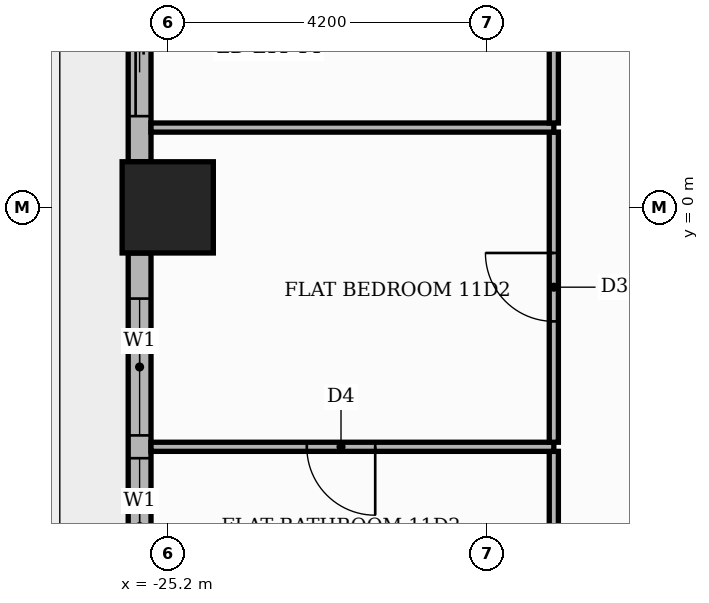
"""IFC4 building model, lengths in metres.
Left out: names, types, materials, properties, quantities, classifications, styles, units other than length and angle.
Written with IfcOpenShell. Run it as: python <this file> out.ifc"""

import sys

from ifc_helpers import new_model, si_unit, direction, frame, frame_2d, origin, origin_2d, place, context, subcontext, project, spatial, rectangle, extrude, element, fill, save


model = new_model("IFC4")
c1 = context("Model", 3, precision=1e-05, world=origin(), true_north=direction((0.0, 1.0)))
c2 = subcontext(c1, "Body", "Model", "MODEL_VIEW")
j1 = project(units=[si_unit("LENGTHUNIT", "METRE"), si_unit("PLANEANGLEUNIT", "RADIAN")], contexts=[c1])
p1 = place(None, origin())
s1 = spatial("IfcSite", under=j1, at=p1, CompositionType="ELEMENT")
p2 = place(p1, origin())
s2 = spatial("IfcBuilding", under=s1, at=p2, CompositionType="ELEMENT")
p3 = place(p2, frame((0.0, 0.0, 50.4)))
s3 = spatial("IfcBuildingStorey", under=s2, at=p3, CompositionType="ELEMENT", Elevation=50.4)
p4 = place(p3, frame((-25.2, 0.0, 0.0), z_axis=(0.0, 0.0, 1.0), x_axis=(1.0, 0.0, 0.0)))
e1 = element("IfcColumn", 1, at=p4, inside=s3, PredefinedType="COLUMN", context=c2, shape_type="SweptSolid", body=[
    extrude(rectangle(XDim=1.2, YDim=1.2, at=origin_2d()), origin(), (0.0, 0.0, 1.0), 3.9),
])
p5 = place(p3, frame((-25.57, 7.8, 0.0), z_axis=(0.0, 0.0, 1.0), x_axis=(0.0, -1.0, 0.0)))
e2 = element("IfcWall", 2, at=p5, inside=s3, PredefinedType="STANDARD", context=c2, shape_type="SweptSolid", body=[
    extrude(rectangle(XDim=7.2, YDim=0.3, at=frame_2d((3.6, 0.0))), origin(), (0.0, 0.0, 1.0), 3.48),
])
p6 = place(p5, frame((0.6, 0.0, 0.9)))
e3 = element("IfcOpeningElement", 3, at=p6, cuts=e2, PredefinedType="OPENING", context=c2, shape_type="SweptSolid", body=[
    extrude(rectangle(XDim=1.8, YDim=2.1, at=frame_2d((0.9, 1.05))), frame((0.0, 0.16, 0.0), z_axis=(0.0, -1.0, 0.0), x_axis=(1.0, 0.0, 0.0)), (0.0, 0.0, 1.0), 0.32),
])
p7 = place(p5, frame((2.7, 0.0, 0.9)))
e4 = element("IfcOpeningElement", 4, at=p7, cuts=e2, PredefinedType="OPENING", context=c2, shape_type="SweptSolid", body=[
    extrude(rectangle(XDim=1.8, YDim=2.1, at=frame_2d((0.9, 1.05))), frame((0.0, 0.16, 0.0), z_axis=(0.0, -1.0, 0.0), x_axis=(1.0, 0.0, 0.0)), (0.0, 0.0, 1.0), 0.32),
])
p8 = place(p5, frame((4.8, 0.0, 0.0)))
e5 = element("IfcOpeningElement", 5, at=p8, cuts=e2, PredefinedType="OPENING", context=c2, shape_type="SweptSolid", body=[
    extrude(rectangle(XDim=1.8, YDim=2.4, at=frame_2d((0.9, 1.2))), frame((0.0, 0.16, 0.0), z_axis=(0.0, -1.0, 0.0), x_axis=(1.0, 0.0, 0.0)), (0.0, 0.0, 1.0), 0.32),
])
p9 = place(p3, frame((-25.57, -0.6, 0.0), z_axis=(0.0, 0.0, 1.0), x_axis=(0.0, -1.0, 0.0)))
e6 = element("IfcWall", 6, at=p9, inside=s3, PredefinedType="STANDARD", context=c2, shape_type="SweptSolid", body=[
    extrude(rectangle(XDim=7.2, YDim=0.3, at=frame_2d((3.6, 0.0))), origin(), (0.0, 0.0, 1.0), 3.48),
])
p10 = place(p9, frame((0.6, 0.0, 0.9)))
e7 = element("IfcOpeningElement", 7, at=p10, cuts=e6, PredefinedType="OPENING", context=c2, shape_type="SweptSolid", body=[
    extrude(rectangle(XDim=1.8, YDim=2.1, at=frame_2d((0.9, 1.05))), frame((0.0, 0.16, 0.0), z_axis=(0.0, -1.0, 0.0), x_axis=(1.0, 0.0, 0.0)), (0.0, 0.0, 1.0), 0.32),
])
p11 = place(p9, frame((2.7, 0.0, 0.9)))
e8 = element("IfcOpeningElement", 8, at=p11, cuts=e6, PredefinedType="OPENING", context=c2, shape_type="SweptSolid", body=[
    extrude(rectangle(XDim=1.8, YDim=2.1, at=frame_2d((0.9, 1.05))), frame((0.0, 0.16, 0.0), z_axis=(0.0, -1.0, 0.0), x_axis=(1.0, 0.0, 0.0)), (0.0, 0.0, 1.0), 0.32),
])
p12 = place(p9, frame((4.8, 0.0, 0.0)))
e9 = element("IfcOpeningElement", 9, at=p12, cuts=e6, PredefinedType="OPENING", context=c2, shape_type="SweptSolid", body=[
    extrude(rectangle(XDim=1.8, YDim=2.4, at=frame_2d((0.9, 1.2))), frame((0.0, 0.16, 0.0), z_axis=(0.0, -1.0, 0.0), x_axis=(1.0, 0.0, 0.0)), (0.0, 0.0, 1.0), 0.32),
])
p13 = place(p3, frame((-20.12, -5.19, 0.0), z_axis=(0.0, 0.0, 1.0), x_axis=(0.0, 1.0, 0.0)))
e10 = element("IfcWall", 10, at=p13, inside=s3, PredefinedType="PARTITIONING", context=c2, shape_type="SweptSolid", body=[
    extrude(rectangle(XDim=1.98, YDim=0.12, at=frame_2d((0.99, 0.0))), origin(), (0.0, 0.0, 1.0), 3.48),
])
p14 = place(p3, frame((-25.42, -3.15, 0.0), z_axis=(0.0, 0.0, 1.0), x_axis=(1.0, 0.0, 0.0)))
e11 = element("IfcWall", 11, at=p14, inside=s3, PredefinedType="PARTITIONING", context=c2, shape_type="SweptSolid", body=[
    extrude(rectangle(XDim=5.3, YDim=0.12, at=frame_2d((2.65, 0.0))), origin(), (0.0, 0.0, 1.0), 3.48),
])
p15 = place(p14, frame((2.05, 0.0, 0.0)))
e12 = element("IfcOpeningElement", 12, at=p15, cuts=e11, PredefinedType="OPENING", context=c2, shape_type="SweptSolid", body=[
    extrude(rectangle(XDim=0.9, YDim=2.1, at=frame_2d((0.45, 1.05))), frame((0.0, 0.07, 0.0), z_axis=(0.0, -1.0, 0.0), x_axis=(1.0, 0.0, 0.0)), (0.0, 0.0, 1.0), 0.14),
])
p16 = place(p3, frame((-20.12, -3.09, 0.0), z_axis=(0.0, 0.0, 1.0), x_axis=(0.0, 1.0, 0.0)))
e13 = element("IfcWall", 13, at=p16, inside=s3, PredefinedType="PARTITIONING", context=c2, shape_type="SweptSolid", body=[
    extrude(rectangle(XDim=4.08, YDim=0.12, at=frame_2d((2.04, 0.0))), origin(), (0.0, 0.0, 1.0), 3.48),
])
p17 = place(p16, frame((1.59, 0.0, 0.0)))
e14 = element("IfcOpeningElement", 14, at=p17, cuts=e13, PredefinedType="OPENING", context=c2, shape_type="SweptSolid", body=[
    extrude(rectangle(XDim=0.9, YDim=2.1, at=frame_2d((0.45, 1.05))), frame((0.0, 0.07, 0.0), z_axis=(0.0, -1.0, 0.0), x_axis=(1.0, 0.0, 0.0)), (0.0, 0.0, 1.0), 0.14),
])
p18 = place(p3, frame((-25.42, 1.05, 0.0), z_axis=(0.0, 0.0, 1.0), x_axis=(1.0, 0.0, 0.0)))
e15 = element("IfcWall", 15, at=p18, inside=s3, PredefinedType="PARTITIONING", context=c2, shape_type="SweptSolid", body=[
    extrude(rectangle(XDim=5.3, YDim=0.12, at=frame_2d((2.65, 0.0))), origin(), (0.0, 0.0, 1.0), 3.48),
])
p19 = place(p3, frame((-20.12, 1.11, 0.0), z_axis=(0.0, 0.0, 1.0), x_axis=(0.0, 1.0, 0.0)))
e16 = element("IfcWall", 16, at=p19, inside=s3, PredefinedType="PARTITIONING", context=c2, shape_type="SweptSolid", body=[
    extrude(rectangle(XDim=4.04, YDim=0.12, at=frame_2d((2.02, 0.0))), origin(), (0.0, 0.0, 1.0), 3.48),
])
p20 = place(p19, frame((1.54, 0.0, 0.0)))
e17 = element("IfcOpeningElement", 17, at=p20, cuts=e16, PredefinedType="OPENING", context=c2, shape_type="SweptSolid", body=[
    extrude(rectangle(XDim=1.0, YDim=2.1, at=frame_2d((0.5, 1.05))), frame((0.0, 0.07, 0.0), z_axis=(0.0, -1.0, 0.0), x_axis=(1.0, 0.0, 0.0)), (0.0, 0.0, 1.0), 0.14),
])
p21 = place(p8, origin())
e18 = element("IfcDoor", 18, at=p21, inside=s3, OperationType="SLIDING_TO_RIGHT", PredefinedType="DOOR", context=c2, shape_type="SweptSolid", body=[
    extrude(rectangle(XDim=1.8, YDim=2.4, at=frame_2d((0.9, 1.2))), frame((0.0, 0.025, 0.0), z_axis=(0.0, -1.0, 0.0), x_axis=(1.0, 0.0, 0.0)), (0.0, 0.0, 1.0), 0.05),
])
fill(e5, e18)
p22 = place(p10, origin())
e19 = element("IfcWindow", 19, at=p22, inside=s3, PartitioningType="SINGLE_PANEL", PredefinedType="WINDOW", context=c2, shape_type="SweptSolid", body=[
    extrude(rectangle(XDim=1.8, YDim=2.1, at=frame_2d((0.9, 1.05))), frame((0.0, 0.03, 0.0), z_axis=(0.0, -1.0, 0.0), x_axis=(1.0, 0.0, 0.0)), (0.0, 0.0, 1.0), 0.06),
])
fill(e7, e19)
p23 = place(p11, origin())
e20 = element("IfcWindow", 20, at=p23, inside=s3, PartitioningType="SINGLE_PANEL", PredefinedType="WINDOW", context=c2, shape_type="SweptSolid", body=[
    extrude(rectangle(XDim=1.8, YDim=2.1, at=frame_2d((0.9, 1.05))), frame((0.0, 0.03, 0.0), z_axis=(0.0, -1.0, 0.0), x_axis=(1.0, 0.0, 0.0)), (0.0, 0.0, 1.0), 0.06),
])
fill(e8, e20)
p24 = place(p17, origin())
e21 = element("IfcDoor", 21, at=p24, inside=s3, OperationType="SINGLE_SWING_RIGHT", PredefinedType="DOOR", context=c2, shape_type="SweptSolid", body=[
    extrude(rectangle(XDim=0.9, YDim=2.1, at=frame_2d((0.45, 1.05))), frame((0.0, 0.025, 0.0), z_axis=(0.0, -1.0, 0.0), x_axis=(1.0, 0.0, 0.0)), (0.0, 0.0, 1.0), 0.05),
])
fill(e14, e21)
p25 = place(p15, frame((0.9, 0.0, 0.0), z_axis=(0.0, 0.0, 1.0), x_axis=(-1.0, 0.0, 0.0)))
e22 = element("IfcDoor", 22, at=p25, inside=s3, OperationType="SINGLE_SWING_RIGHT", PredefinedType="DOOR", context=c2, shape_type="SweptSolid", body=[
    extrude(rectangle(XDim=0.9, YDim=2.1, at=frame_2d((0.45, 1.05))), frame((0.0, 0.025, 0.0), z_axis=(0.0, -1.0, 0.0), x_axis=(1.0, 0.0, 0.0)), (0.0, 0.0, 1.0), 0.05),
])
fill(e12, e22)
save(model, sys.argv[1])
